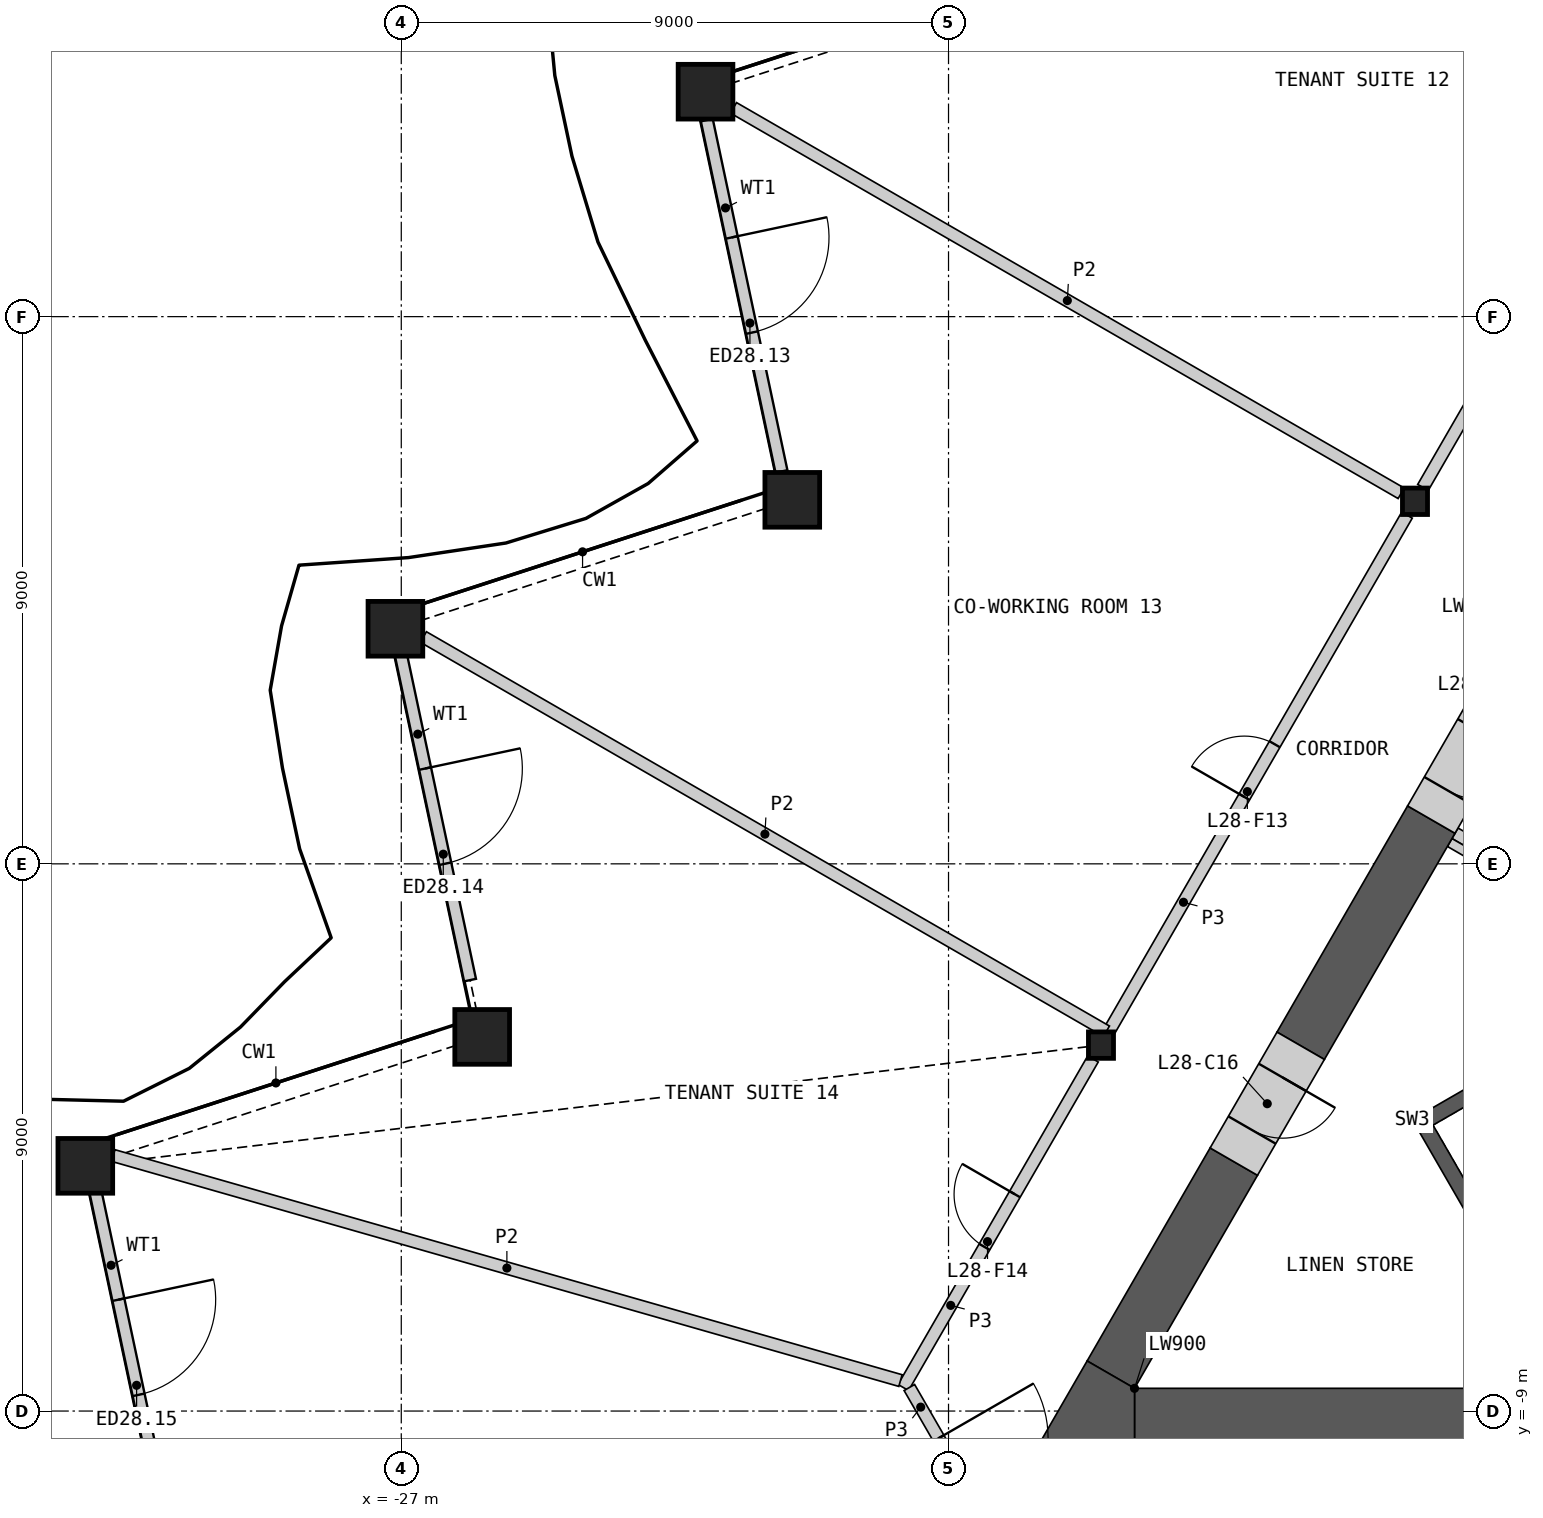
"""IFC4 building model, lengths in metres.
Left out: names, types, materials, properties, quantities, classifications, styles, units other than length and angle.
Written with IfcOpenShell. Run it as: python <this file> out.ifc"""

import sys

from ifc_helpers import new_model, si_unit, direction, frame, frame_2d, origin, origin_2d, place, context, subcontext, project, spatial, polyline, rectangle, hollow_rectangle, i_section, outline, extrude, element, fill, save


model = new_model("IFC4")
c1 = context("Model", 3, precision=1e-05, world=origin(), true_north=direction((0.0, 1.0)))
c2 = subcontext(c1, "Body", "Model", "MODEL_VIEW")
j1 = project(units=[si_unit("LENGTHUNIT", "METRE"), si_unit("PLANEANGLEUNIT", "RADIAN")], contexts=[c1])
p1 = place(None, origin())
s1 = spatial("IfcSite", under=j1, at=p1, CompositionType="ELEMENT")
p2 = place(p1, origin())
s2 = spatial("IfcBuilding", under=s1, at=p2, CompositionType="ELEMENT")
p3 = place(p2, frame((0.0, 0.0, 133.2)))
s3 = spatial("IfcBuildingStorey", under=s2, at=p3, CompositionType="ELEMENT", Elevation=133.2)
for number, where, z_axis, x_axis in (
    (1, (-21.996, 12.699, 0.0), (0.0, 0.0, 1.0), (1.0, 0.0, 0.0)),
    (2, (-20.57, 5.987, 0.0), (0.0, 0.0, 1.0), (1.0, 0.0, 0.0)),
    (3, (-27.096, 3.866, 0.0), (0.0, 0.0, 1.0), (1.0, 0.0, 0.0)),
    (4, (-25.669, -2.846, 0.0), (0.0, 0.0, 1.0), (1.0, 0.0, 0.0)),
    (5, (-32.196, -4.967, 0.0), (0.0, 0.0, 1.0), (1.0, 0.0, 0.0)),
):
    element("IfcColumn", number, at=place(p3, frame(where, z_axis=z_axis, x_axis=x_axis)), inside=s3, PredefinedType="COLUMN", context=c2, shape_type="SweptSolid", body=[
        extrude(hollow_rectangle(XDim=0.9, YDim=0.9, WallThickness=0.06, at=origin_2d()), origin(), (0.0, 0.0, 1.0), 4.2),
    ])
for number, where, z_axis, x_axis in (
    (6, (-10.328, 5.963, 0.0), (0.0, 0.0, 1.0), (1.0, 0.0, 0.0)),
    (7, (-15.493, -2.982, 0.0), (0.0, 0.0, 1.0), (1.0, 0.0, 0.0)),
):
    element("IfcColumn", number, at=place(p3, frame(where, z_axis=z_axis, x_axis=x_axis)), inside=s3, PredefinedType="COLUMN", context=c2, shape_type="SweptSolid", body=[
        extrude(i_section(OverallWidth=0.412, OverallDepth=0.435, WebThickness=0.036, FlangeThickness=0.057, at=origin_2d()), origin(), (0.0, 0.0, 1.0), 4.2),
    ])
p4 = place(p3, frame((-21.976, 12.233, 0.0), z_axis=(0.0, 0.0, 1.0), x_axis=(0.207925965623, -0.978144566421, 0.0)))
e8 = element("IfcWall", 8, at=p4, inside=s3, PredefinedType="SOLIDWALL", context=c2, shape_type="SweptSolid", body=[
    extrude(rectangle(XDim=5.908, YDim=0.2, at=frame_2d((2.954, 0.0))), origin(), (0.0, 0.0, 1.0), 3.189),
])
p5 = place(p4, frame((1.973, 0.0, 0.0)))
e9 = element("IfcOpeningElement", 9, at=p5, cuts=e8, PredefinedType="OPENING", context=c2, shape_type="SweptSolid", body=[
    extrude(rectangle(XDim=1.6, YDim=2.4, at=frame_2d((0.8, 1.2))), frame((0.0, 0.11, 0.0), z_axis=(0.0, -1.0, 0.0), x_axis=(1.0, 0.0, 0.0)), (0.0, 0.0, 1.0), 0.22),
])
p6 = place(p3, frame((-27.016, 3.482, 0.0), z_axis=(0.0, 0.0, 1.0), x_axis=(0.207902173992, -0.978149623549, 0.0)))
e10 = element("IfcWall", 10, at=p6, inside=s3, PredefinedType="SOLIDWALL", context=c2, shape_type="SweptSolid", body=[
    extrude(rectangle(XDim=5.515, YDim=0.2, at=frame_2d((2.757, 0.0))), origin(), (0.0, 0.0, 1.0), 3.189),
])
p7 = place(p6, frame((1.957, 0.0, 0.0)))
e11 = element("IfcOpeningElement", 11, at=p7, cuts=e10, PredefinedType="OPENING", context=c2, shape_type="SweptSolid", body=[
    extrude(rectangle(XDim=1.6, YDim=2.4, at=frame_2d((0.8, 1.2))), frame((0.0, 0.11, 0.0), z_axis=(0.0, -1.0, 0.0), x_axis=(1.0, 0.0, 0.0)), (0.0, 0.0, 1.0), 0.22),
])
p8 = place(p3, frame((-32.059, -5.254, 0.0), z_axis=(0.0, 0.0, 1.0), x_axis=(0.207902173992, -0.978149623549, 0.0)))
e12 = element("IfcWall", 12, at=p8, inside=s3, PredefinedType="SOLIDWALL", context=c2, shape_type="SweptSolid", body=[
    extrude(rectangle(XDim=5.515, YDim=0.2, at=frame_2d((2.757, 0.0))), origin(), (0.0, 0.0, 1.0), 3.189),
])
p9 = place(p8, frame((1.957, 0.0, 0.0)))
e13 = element("IfcOpeningElement", 13, at=p9, cuts=e12, PredefinedType="OPENING", context=c2, shape_type="SweptSolid", body=[
    extrude(rectangle(XDim=1.6, YDim=2.4, at=frame_2d((0.8, 1.2))), frame((0.0, 0.11, 0.0), z_axis=(0.0, -1.0, 0.0), x_axis=(1.0, 0.0, 0.0)), (0.0, 0.0, 1.0), 0.22),
])
p10 = place(p3, frame((-8.181, -0.357, 0.0), z_axis=(0.0, 0.0, 1.0), x_axis=(-0.866024871741, 0.500000921525, 0.0)))
e14 = element("IfcWall", 14, at=p10, inside=s3, PredefinedType="SHEAR", context=c2, shape_type="SweptSolid", body=[
    extrude(rectangle(XDim=1.72, YDim=0.2, at=frame_2d((0.86, 0.0))), origin(), (0.0, 0.0, 1.0), 3.8),
])
p11 = place(p3, origin())
e15 = element("IfcWall", 15, at=p11, inside=s3, PredefinedType="SHEAR", context=c2, shape_type="SweptSolid", body=[
    extrude(outline(polyline([(-5.307, -1.281), (-10.374, -4.206), (-10.032, -4.298), (-5.182, -1.498), (-5.307, -1.281)])), origin(), (0.0, 0.0, 1.0), 3.8),
])
p12 = place(p3, origin())
e16 = element("IfcWall", 16, at=p12, inside=s3, PredefinedType="SHEAR", context=c2, shape_type="SweptSolid", body=[
    extrude(outline(polyline([(-10.374, -4.206), (-8.83, -6.881), (-8.738, -6.539), (-10.032, -4.298), (-10.374, -4.206)])), origin(), (0.0, 0.0, 1.0), 3.8),
])
p13 = place(p3, frame((-8.268, -0.509, 0.0), z_axis=(0.0, 0.0, 1.0), x_axis=(-0.866024871741, 0.500000921525, 0.0)))
e17 = element("IfcWall", 17, at=p13, inside=s3, PredefinedType="PARTITIONING", context=c2, shape_type="SweptSolid", body=[
    extrude(rectangle(XDim=1.72, YDim=0.15, at=frame_2d((0.86, 0.0))), origin(), (0.0, 0.0, 1.0), 3.8),
])
p14 = place(p3, frame((-14.941, -9.076, 0.0), z_axis=(0.0, 0.0, 1.0), x_axis=(1.0, 0.0, 0.0)))
e18 = element("IfcWall", 18, at=p14, inside=s3, PredefinedType="SHEAR", context=c2, shape_type="SweptSolid", body=[
    extrude(rectangle(XDim=11.275, YDim=0.9, at=frame_2d((5.638, 0.0))), origin(), (0.0, 0.0, 1.0), 3.8),
])
p15 = place(p3, frame((-10.06, 0.728, 0.0), z_axis=(0.0, 0.0, 1.0), x_axis=(-0.499996331799, -0.866027521611, 0.0)))
e19 = element("IfcWall", 19, at=p15, inside=s3, PredefinedType="SHEAR", context=c2, shape_type="SweptSolid", body=[
    extrude(rectangle(XDim=4.295, YDim=0.9, at=frame_2d((2.148, 0.0))), origin(), (0.0, 0.0, 1.0), 3.8),
])
p16 = place(p3, frame((-13.308, -4.898, 0.0), z_axis=(0.0, 0.0, 1.0), x_axis=(-0.499974938593, -0.866039872511, 0.0)))
e20 = element("IfcWall", 20, at=p16, inside=s3, PredefinedType="SHEAR", context=c2, shape_type="SweptSolid", body=[
    extrude(rectangle(XDim=4.046, YDim=0.9, at=frame_2d((2.023, 0.0))), origin(), (0.0, 0.0, 1.0), 3.8),
])
p17 = place(p3, origin())
e21 = element("IfcWall", 21, at=p17, inside=s3, PredefinedType="SHEAR", context=c2, shape_type="SweptSolid", body=[
    extrude(outline(polyline([(-14.941, -8.626), (-14.941, -9.526), (-16.5, -9.526), (-15.721, -8.176), (-14.941, -8.626)])), origin(), (0.0, 0.0, 1.0), 3.8),
])
p18 = place(p3, frame((-12.208, -2.992, 0.0), z_axis=(0.0, 0.0, 1.0), x_axis=(-0.50002983664, -0.866008176907, 0.0)))
e22 = element("IfcWall", 22, at=p18, inside=s3, PredefinedType="SHEAR", context=c2, shape_type="SweptSolid", body=[
    extrude(rectangle(XDim=2.2, YDim=0.9, at=frame_2d((1.1, 0.0))), origin(), (0.0, 0.0, 1.0), 3.8),
])
p19 = place(p18, frame((0.6, 0.0, 0.0)))
e23 = element("IfcOpeningElement", 23, at=p19, cuts=e22, PredefinedType="OPENING", context=c2, shape_type="SweptSolid", body=[
    extrude(rectangle(XDim=1.0, YDim=2.1, at=frame_2d((0.5, 1.05))), frame((0.0, 0.46, 0.0), z_axis=(0.0, -1.0, 0.0), x_axis=(1.0, 0.0, 0.0)), (0.0, 0.0, 1.0), 0.92),
])
p20 = place(p3, frame((-8.96, 2.633, 0.0), z_axis=(0.0, 0.0, 1.0), x_axis=(-0.50002983664, -0.866008176907, 0.0)))
e24 = element("IfcWall", 24, at=p20, inside=s3, PredefinedType="SHEAR", context=c2, shape_type="SweptSolid", body=[
    extrude(rectangle(XDim=2.2, YDim=0.9, at=frame_2d((1.1, 0.0))), origin(), (0.0, 0.0, 1.0), 3.8),
])
p21 = place(p20, frame((0.55, 0.0, 0.0)))
e25 = element("IfcOpeningElement", 25, at=p21, cuts=e24, PredefinedType="OPENING", context=c2, shape_type="SweptSolid", body=[
    extrude(rectangle(XDim=1.1, YDim=2.1, at=frame_2d((0.55, 1.05))), frame((0.0, 0.46, 0.0), z_axis=(0.0, -1.0, 0.0), x_axis=(1.0, 0.0, 0.0)), (0.0, 0.0, 1.0), 0.92),
])
p22 = place(p3, frame((-15.361, -2.754, 0.0), z_axis=(0.0, 0.0, 1.0), x_axis=(0.500004141693, 0.866023012564, 0.0)))
e26 = element("IfcWall", 26, at=p22, inside=s3, PredefinedType="PARTITIONING", context=c2, shape_type="SweptSolid", body=[
    extrude(rectangle(XDim=9.803, YDim=0.2, at=frame_2d((4.902, 0.0))), origin(), (0.0, 0.0, 1.0), 3.8),
])
p23 = place(p22, frame((4.452, 0.0, 0.0)))
e27 = element("IfcOpeningElement", 27, at=p23, cuts=e26, PredefinedType="OPENING", context=c2, shape_type="SweptSolid", body=[
    extrude(rectangle(XDim=1.0, YDim=2.1, at=frame_2d((0.5, 1.05))), frame((0.0, 0.11, 0.0), z_axis=(0.0, -1.0, 0.0), x_axis=(1.0, 0.0, 0.0)), (0.0, 0.0, 1.0), 0.22),
])
p24 = place(p3, frame((-10.197, 6.19, 0.0), z_axis=(0.0, 0.0, 1.0), x_axis=(0.500012035596, 0.866018454918, 0.0)))
e28 = element("IfcWall", 28, at=p24, inside=s3, PredefinedType="PARTITIONING", context=c2, shape_type="SweptSolid", body=[
    extrude(rectangle(XDim=9.803, YDim=0.2, at=frame_2d((4.902, 0.0))), origin(), (0.0, 0.0, 1.0), 3.8),
])
p25 = place(p24, frame((4.452, 0.0, 0.0)))
e29 = element("IfcOpeningElement", 29, at=p25, cuts=e28, PredefinedType="OPENING", context=c2, shape_type="SweptSolid", body=[
    extrude(rectangle(XDim=1.0, YDim=2.1, at=frame_2d((0.5, 1.05))), frame((0.0, 0.11, 0.0), z_axis=(0.0, -1.0, 0.0), x_axis=(1.0, 0.0, 0.0)), (0.0, 0.0, 1.0), 0.22),
])
p26 = place(p3, frame((-18.744, -8.613, 0.0), z_axis=(0.0, 0.0, 1.0), x_axis=(0.499997920671, 0.866026604282, 0.0)))
e30 = element("IfcWall", 30, at=p26, inside=s3, PredefinedType="PARTITIONING", context=c2, shape_type="SweptSolid", body=[
    extrude(rectangle(XDim=6.24, YDim=0.2, at=frame_2d((3.12, 0.0))), origin(), (0.0, 0.0, 1.0), 3.8),
])
p27 = place(p26, frame((2.67, 0.0, 0.0)))
e31 = element("IfcOpeningElement", 31, at=p27, cuts=e30, PredefinedType="OPENING", context=c2, shape_type="SweptSolid", body=[
    extrude(rectangle(XDim=1.0, YDim=2.1, at=frame_2d((0.5, 1.05))), frame((0.0, 0.11, 0.0), z_axis=(0.0, -1.0, 0.0), x_axis=(1.0, 0.0, 0.0)), (0.0, 0.0, 1.0), 0.22),
])
p28 = place(p3, frame((-18.644, -8.613, 0.0), z_axis=(0.0, 0.0, 1.0), x_axis=(0.499958791762, -0.866049194065, 0.0)))
e32 = element("IfcWall", 32, at=p28, inside=s3, PredefinedType="PARTITIONING", context=c2, shape_type="SweptSolid", body=[
    extrude(rectangle(XDim=3.726, YDim=0.2, at=frame_2d((1.863, 0.0))), origin(), (0.0, 0.0, 1.0), 3.8),
])
p29 = place(p28, frame((0.963, 0.0, 0.0)))
e33 = element("IfcOpeningElement", 33, at=p29, cuts=e32, PredefinedType="OPENING", context=c2, shape_type="SweptSolid", body=[
    extrude(rectangle(XDim=1.8, YDim=2.1, at=frame_2d((0.9, 1.05))), frame((0.0, 0.11, 0.0), z_axis=(0.0, -1.0, 0.0), x_axis=(1.0, 0.0, 0.0)), (0.0, 0.0, 1.0), 0.22),
])
p30 = place(p3, frame((-31.736, -4.798, 0.0), z_axis=(0.0, 0.0, 1.0), x_axis=(0.961478776026, -0.274879179372, 0.0)))
e34 = element("IfcWall", 34, at=p30, inside=s3, PredefinedType="PARTITIONING", context=c2, shape_type="SweptSolid", body=[
    extrude(rectangle(XDim=13.465, YDim=0.2, at=frame_2d((6.732, 0.0))), origin(), (0.0, 0.0, 1.0), 2.885),
])
p31 = place(p3, frame((-26.636, 3.731, 0.0), z_axis=(0.0, 0.0, 1.0), x_axis=(0.866024473704, -0.500001610943, 0.0)))
e35 = element("IfcWall", 35, at=p31, inside=s3, PredefinedType="PARTITIONING", context=c2, shape_type="SweptSolid", body=[
    extrude(rectangle(XDim=12.971, YDim=0.2, at=frame_2d((6.485, 0.0))), origin(), (0.0, 0.0, 1.0), 2.885),
])
p32 = place(p3, frame((-21.536, 12.434, 0.0), z_axis=(0.0, 0.0, 1.0), x_axis=(0.86602461759, -0.500001361726, 0.0)))
e36 = element("IfcWall", 36, at=p32, inside=s3, PredefinedType="PARTITIONING", context=c2, shape_type="SweptSolid", body=[
    extrude(rectangle(XDim=12.679, YDim=0.2, at=frame_2d((6.34, 0.0))), origin(), (0.0, 0.0, 1.0), 2.885),
])
p33 = place(p5, origin())
e37 = element("IfcDoor", 37, at=p33, inside=s3, OperationType="DOUBLE_DOOR_SINGLE_SWING", PredefinedType="DOOR", context=c2, shape_type="SweptSolid", body=[
    extrude(rectangle(XDim=1.6, YDim=2.4, at=frame_2d((0.8, 1.2))), frame((0.0, 0.025, 0.0), z_axis=(0.0, -1.0, 0.0), x_axis=(1.0, 0.0, 0.0)), (0.0, 0.0, 1.0), 0.05),
])
fill(e9, e37)
p34 = place(p7, origin())
e38 = element("IfcDoor", 38, at=p34, inside=s3, OperationType="DOUBLE_DOOR_SINGLE_SWING", PredefinedType="DOOR", context=c2, shape_type="SweptSolid", body=[
    extrude(rectangle(XDim=1.6, YDim=2.4, at=frame_2d((0.8, 1.2))), frame((0.0, 0.025, 0.0), z_axis=(0.0, -1.0, 0.0), x_axis=(1.0, 0.0, 0.0)), (0.0, 0.0, 1.0), 0.05),
])
fill(e11, e38)
p35 = place(p9, origin())
e39 = element("IfcDoor", 39, at=p35, inside=s3, OperationType="DOUBLE_DOOR_SINGLE_SWING", PredefinedType="DOOR", context=c2, shape_type="SweptSolid", body=[
    extrude(rectangle(XDim=1.6, YDim=2.4, at=frame_2d((0.8, 1.2))), frame((0.0, 0.025, 0.0), z_axis=(0.0, -1.0, 0.0), x_axis=(1.0, 0.0, 0.0)), (0.0, 0.0, 1.0), 0.05),
])
fill(e13, e39)
p36 = place(p19, origin())
e40 = element("IfcDoor", 40, at=p36, inside=s3, OperationType="SINGLE_SWING_LEFT", PredefinedType="DOOR", context=c2, shape_type="SweptSolid", body=[
    extrude(rectangle(XDim=1.0, YDim=2.1, at=frame_2d((0.5, 1.05))), frame((0.0, 0.205, 0.0), z_axis=(0.0, -1.0, 0.0), x_axis=(1.0, 0.0, 0.0)), (0.0, 0.0, 1.0), 0.05),
])
fill(e23, e40)
p37 = place(p21, origin())
e41 = element("IfcDoor", 41, at=p37, inside=s3, OperationType="SINGLE_SWING_LEFT", PredefinedType="DOOR", context=c2, shape_type="SweptSolid", body=[
    extrude(rectangle(XDim=1.1, YDim=2.1, at=frame_2d((0.55, 1.05))), frame((0.0, 0.205, 0.0), z_axis=(0.0, -1.0, 0.0), x_axis=(1.0, 0.0, 0.0)), (0.0, 0.0, 1.0), 0.05),
])
fill(e25, e41)
p38 = place(p23, origin())
e42 = element("IfcDoor", 42, at=p38, inside=s3, OperationType="SINGLE_SWING_LEFT", PredefinedType="DOOR", context=c2, shape_type="SweptSolid", body=[
    extrude(rectangle(XDim=1.0, YDim=2.1, at=frame_2d((0.5, 1.05))), frame((0.0, 0.025, 0.0), z_axis=(0.0, -1.0, 0.0), x_axis=(1.0, 0.0, 0.0)), (0.0, 0.0, 1.0), 0.05),
])
fill(e27, e42)
p39 = place(p27, origin())
e43 = element("IfcDoor", 43, at=p39, inside=s3, OperationType="SINGLE_SWING_RIGHT", PredefinedType="DOOR", context=c2, shape_type="SweptSolid", body=[
    extrude(rectangle(XDim=1.0, YDim=2.1, at=frame_2d((0.5, 1.05))), frame((0.0, 0.025, 0.0), z_axis=(0.0, -1.0, 0.0), x_axis=(1.0, 0.0, 0.0)), (0.0, 0.0, 1.0), 0.05),
])
fill(e31, e43)
p40 = place(p29, origin())
e44 = element("IfcDoor", 44, at=p40, inside=s3, OperationType="DOUBLE_DOOR_SINGLE_SWING", PredefinedType="DOOR", context=c2, shape_type="SweptSolid", body=[
    extrude(rectangle(XDim=1.8, YDim=2.1, at=frame_2d((0.9, 1.05))), frame((0.0, 0.025, 0.0), z_axis=(0.0, -1.0, 0.0), x_axis=(1.0, 0.0, 0.0)), (0.0, 0.0, 1.0), 0.05),
])
fill(e33, e44)
save(model, sys.argv[1])
